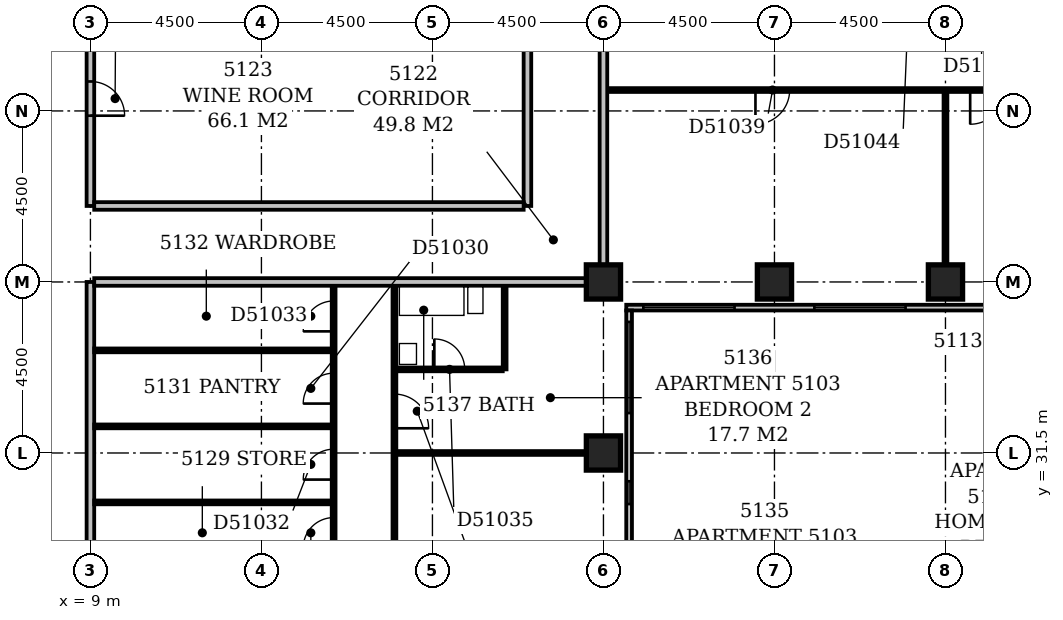
"""IFC4 building model, lengths in metres.
Left out: names, types, materials, properties, quantities, classifications, styles, units other than length and angle.
Written with IfcOpenShell. Run it as: python <this file> out.ifc"""

import sys

from ifc_helpers import new_model, si_unit, direction, frame, frame_2d, origin, origin_2d, place, context, subcontext, project, spatial, rectangle, extrude, element, fill, save


model = new_model("IFC4")
c1 = context("Model", 3, precision=1e-05, world=origin(), true_north=direction((0.0, 1.0)))
c2 = subcontext(c1, "Body", "Model", "MODEL_VIEW")
j1 = project(units=[si_unit("LENGTHUNIT", "METRE"), si_unit("PLANEANGLEUNIT", "RADIAN")], contexts=[c1])
p1 = place(None, origin())
s1 = spatial("IfcSite", under=j1, at=p1, CompositionType="ELEMENT")
p2 = place(p1, origin())
s2 = spatial("IfcBuilding", under=s1, at=p2, CompositionType="ELEMENT")
p3 = place(p2, frame((0.0, 0.0, 200.6)))
s3 = spatial("IfcBuildingStorey", under=s2, at=p3, CompositionType="ELEMENT", Elevation=200.6)
for number, where, z_axis, x_axis in (
    (1, (22.5, 31.5, -0.3), (0.0, 0.0, 1.0), (1.0, 0.0, 0.0)),
    (2, (22.5, 36.0, -0.3), (0.0, 0.0, 1.0), (1.0, 0.0, 0.0)),
    (3, (27.0, 36.0, -0.3), (0.0, 0.0, 1.0), (1.0, 0.0, 0.0)),
    (4, (31.5, 36.0, -0.3), (0.0, 0.0, 1.0), (1.0, 0.0, 0.0)),
):
    element("IfcColumn", number, at=place(p3, frame(where, z_axis=z_axis, x_axis=x_axis)), inside=s3, PredefinedType="COLUMN", context=c2, shape_type="SweptSolid", body=[
        extrude(rectangle(XDim=0.9, YDim=0.9, at=origin_2d()), origin(), (0.0, 0.0, 1.0), 3.6),
    ])
p4 = place(p3, frame((23.175, 17.4, 0.0), z_axis=(0.0, 0.0, 1.0), x_axis=(0.0, 1.0, 0.0)))
e5 = element("IfcWall", 5, at=p4, inside=s3, PredefinedType="STANDARD", context=c2, shape_type="SweptSolid", body=[
    extrude(rectangle(XDim=17.85, YDim=0.15, at=frame_2d((8.925, 0.0))), origin(), (0.0, 0.0, 1.0), 2.7),
])
p5 = place(p4, frame((1.65, 0.0, 0.6)))
e6 = element("IfcOpeningElement", 6, at=p5, cuts=e5, PredefinedType="OPENING", context=c2, shape_type="SweptSolid", body=[
    extrude(rectangle(XDim=2.4, YDim=1.8, at=frame_2d((1.2, 0.9))), frame((0.0, 0.087, 0.0), z_axis=(0.0, -1.0, 0.0), x_axis=(1.0, 0.0, 0.0)), (0.0, 0.0, 1.0), 0.174),
])
p6 = place(p4, frame((6.15, 0.0, 0.6)))
e7 = element("IfcOpeningElement", 7, at=p6, cuts=e5, PredefinedType="OPENING", context=c2, shape_type="SweptSolid", body=[
    extrude(rectangle(XDim=2.4, YDim=1.8, at=frame_2d((1.2, 0.9))), frame((0.0, 0.087, 0.0), z_axis=(0.0, -1.0, 0.0), x_axis=(1.0, 0.0, 0.0)), (0.0, 0.0, 1.0), 0.174),
])
p7 = place(p4, frame((10.252, 0.0, 0.6)))
e8 = element("IfcOpeningElement", 8, at=p7, cuts=e5, PredefinedType="OPENING", context=c2, shape_type="SweptSolid", body=[
    extrude(rectangle(XDim=0.6, YDim=1.8, at=frame_2d((0.3, 0.9))), frame((0.0, 0.087, 0.0), z_axis=(0.0, -1.0, 0.0), x_axis=(1.0, 0.0, 0.0)), (0.0, 0.0, 1.0), 0.174),
])
p8 = place(p4, frame((12.756, 0.0, 0.6)))
e9 = element("IfcOpeningElement", 9, at=p8, cuts=e5, PredefinedType="OPENING", context=c2, shape_type="SweptSolid", body=[
    extrude(rectangle(XDim=0.6, YDim=1.8, at=frame_2d((0.3, 0.9))), frame((0.0, 0.087, 0.0), z_axis=(0.0, -1.0, 0.0), x_axis=(1.0, 0.0, 0.0)), (0.0, 0.0, 1.0), 0.174),
])
p9 = place(p4, frame((15.15, 0.0, 0.6)))
e10 = element("IfcOpeningElement", 10, at=p9, cuts=e5, PredefinedType="OPENING", context=c2, shape_type="SweptSolid", body=[
    extrude(rectangle(XDim=2.4, YDim=1.8, at=frame_2d((1.2, 0.9))), frame((0.0, 0.087, 0.0), z_axis=(0.0, -1.0, 0.0), x_axis=(1.0, 0.0, 0.0)), (0.0, 0.0, 1.0), 0.174),
])
p10 = place(p3, frame((23.1, 35.325, 0.0), z_axis=(0.0, 0.0, 1.0), x_axis=(1.0, 0.0, 0.0)))
e11 = element("IfcWall", 11, at=p10, inside=s3, PredefinedType="STANDARD", context=c2, shape_type="SweptSolid", body=[
    extrude(rectangle(XDim=27.15, YDim=0.15, at=frame_2d((13.575, 0.0))), origin(), (0.0, 0.0, 1.0), 2.7),
])
p11 = place(p10, frame((0.45, 0.0, 0.6)))
e12 = element("IfcOpeningElement", 12, at=p11, cuts=e11, PredefinedType="OPENING", context=c2, shape_type="SweptSolid", body=[
    extrude(rectangle(XDim=2.4, YDim=1.8, at=frame_2d((1.2, 0.9))), frame((0.0, 0.087, 0.0), z_axis=(0.0, -1.0, 0.0), x_axis=(1.0, 0.0, 0.0)), (0.0, 0.0, 1.0), 0.174),
])
p12 = place(p10, frame((4.95, 0.0, 0.6)))
e13 = element("IfcOpeningElement", 13, at=p12, cuts=e11, PredefinedType="OPENING", context=c2, shape_type="SweptSolid", body=[
    extrude(rectangle(XDim=2.4, YDim=1.8, at=frame_2d((1.2, 0.9))), frame((0.0, 0.087, 0.0), z_axis=(0.0, -1.0, 0.0), x_axis=(1.0, 0.0, 0.0)), (0.0, 0.0, 1.0), 0.174),
])
p13 = place(p10, frame((9.45, 0.0, 0.6)))
e14 = element("IfcOpeningElement", 14, at=p13, cuts=e11, PredefinedType="OPENING", context=c2, shape_type="SweptSolid", body=[
    extrude(rectangle(XDim=2.4, YDim=1.8, at=frame_2d((1.2, 0.9))), frame((0.0, 0.087, 0.0), z_axis=(0.0, -1.0, 0.0), x_axis=(1.0, 0.0, 0.0)), (0.0, 0.0, 1.0), 0.174),
])
p14 = place(p10, frame((13.95, 0.0, 0.6)))
e15 = element("IfcOpeningElement", 15, at=p14, cuts=e11, PredefinedType="OPENING", context=c2, shape_type="SweptSolid", body=[
    extrude(rectangle(XDim=2.4, YDim=1.8, at=frame_2d((1.2, 0.9))), frame((0.0, 0.087, 0.0), z_axis=(0.0, -1.0, 0.0), x_axis=(1.0, 0.0, 0.0)), (0.0, 0.0, 1.0), 0.174),
])
p15 = place(p10, frame((18.45, 0.0, 0.6)))
e16 = element("IfcOpeningElement", 16, at=p15, cuts=e11, PredefinedType="OPENING", context=c2, shape_type="SweptSolid", body=[
    extrude(rectangle(XDim=2.4, YDim=1.8, at=frame_2d((1.2, 0.9))), frame((0.0, 0.087, 0.0), z_axis=(0.0, -1.0, 0.0), x_axis=(1.0, 0.0, 0.0)), (0.0, 0.0, 1.0), 0.174),
])
p16 = place(p10, frame((22.95, 0.0, 0.6)))
e17 = element("IfcOpeningElement", 17, at=p16, cuts=e11, PredefinedType="OPENING", context=c2, shape_type="SweptSolid", body=[
    extrude(rectangle(XDim=2.4, YDim=1.8, at=frame_2d((1.2, 0.9))), frame((0.0, 0.087, 0.0), z_axis=(0.0, -1.0, 0.0), x_axis=(1.0, 0.0, 0.0)), (0.0, 0.0, 1.0), 0.174),
])
p17 = place(p3, frame((9.0, 5.0, 0.0), z_axis=(0.0, 0.0, 1.0), x_axis=(0.0, 1.0, 0.0)))
e18 = element("IfcWall", 18, at=p17, inside=s3, PredefinedType="PARTITIONING", context=c2, shape_type="SweptSolid", body=[
    extrude(rectangle(XDim=31.0, YDim=0.2, at=frame_2d((15.5, 0.0))), origin(), (0.0, 0.0, 1.0), 3.3),
])
p18 = place(p17, frame((18.4, 0.0, 0.0)))
e19 = element("IfcOpeningElement", 19, at=p18, cuts=e18, PredefinedType="OPENING", context=c2, shape_type="SweptSolid", body=[
    extrude(rectangle(XDim=1.0, YDim=2.1, at=frame_2d((0.5, 1.05))), frame((0.0, 0.112, 0.0), z_axis=(0.0, -1.0, 0.0), x_axis=(1.0, 0.0, 0.0)), (0.0, 0.0, 1.0), 0.224),
])
p19 = place(p17, frame((11.7, 0.0, 0.0)))
e20 = element("IfcOpeningElement", 20, at=p19, cuts=e18, PredefinedType="OPENING", context=c2, shape_type="SweptSolid", body=[
    extrude(rectangle(XDim=1.0, YDim=2.1, at=frame_2d((0.5, 1.05))), frame((0.0, 0.112, 0.0), z_axis=(0.0, -1.0, 0.0), x_axis=(1.0, 0.0, 0.0)), (0.0, 0.0, 1.0), 0.224),
])
p20 = place(p17, frame((1.5, 0.0, 0.0)))
e21 = element("IfcOpeningElement", 21, at=p20, cuts=e18, PredefinedType="OPENING", context=c2, shape_type="SweptSolid", body=[
    extrude(rectangle(XDim=0.9, YDim=2.1, at=frame_2d((0.45, 1.05))), frame((0.0, 0.112, 0.0), z_axis=(0.0, -1.0, 0.0), x_axis=(1.0, 0.0, 0.0)), (0.0, 0.0, 1.0), 0.224),
])
p21 = place(p3, frame((17.0, 18.1, 0.0), z_axis=(0.0, 0.0, 1.0), x_axis=(0.0, 1.0, 0.0)))
e22 = element("IfcWall", 22, at=p21, inside=s3, PredefinedType="PARTITIONING", context=c2, shape_type="SweptSolid", body=[
    extrude(rectangle(XDim=17.8, YDim=0.1, at=frame_2d((8.9, 0.0))), origin(), (0.0, 0.0, 1.0), 3.3),
])
p22 = place(p21, frame((2.85, 0.0, 0.0)))
e23 = element("IfcOpeningElement", 23, at=p22, cuts=e22, PredefinedType="OPENING", context=c2, shape_type="SweptSolid", body=[
    extrude(rectangle(XDim=0.9, YDim=2.1, at=frame_2d((0.45, 1.05))), frame((0.0, 0.062, 0.0), z_axis=(0.0, -1.0, 0.0), x_axis=(1.0, 0.0, 0.0)), (0.0, 0.0, 1.0), 0.124),
])
p23 = place(p21, frame((8.4, 0.0, 0.0)))
e24 = element("IfcOpeningElement", 24, at=p23, cuts=e22, PredefinedType="OPENING", context=c2, shape_type="SweptSolid", body=[
    extrude(rectangle(XDim=0.9, YDim=2.1, at=frame_2d((0.45, 1.05))), frame((0.0, 0.062, 0.0), z_axis=(0.0, -1.0, 0.0), x_axis=(1.0, 0.0, 0.0)), (0.0, 0.0, 1.0), 0.124),
])
p24 = place(p21, frame((14.05, 0.0, 0.0)))
e25 = element("IfcOpeningElement", 25, at=p24, cuts=e22, PredefinedType="OPENING", context=c2, shape_type="SweptSolid", body=[
    extrude(rectangle(XDim=0.9, YDim=2.1, at=frame_2d((0.45, 1.05))), frame((0.0, 0.062, 0.0), z_axis=(0.0, -1.0, 0.0), x_axis=(1.0, 0.0, 0.0)), (0.0, 0.0, 1.0), 0.124),
])
p25 = place(p3, frame((15.4, 24.7, 0.0), z_axis=(0.0, 0.0, 1.0), x_axis=(0.0, 1.0, 0.0)))
e26 = element("IfcWall", 26, at=p25, inside=s3, PredefinedType="PARTITIONING", context=c2, shape_type="SweptSolid", body=[
    extrude(rectangle(XDim=11.2, YDim=0.1, at=frame_2d((5.6, 0.0))), origin(), (0.0, 0.0, 1.0), 3.3),
])
p26 = place(p25, frame((0.8, 0.0, 0.0)))
e27 = element("IfcOpeningElement", 27, at=p26, cuts=e26, PredefinedType="OPENING", context=c2, shape_type="SweptSolid", body=[
    extrude(rectangle(XDim=0.8, YDim=2.1, at=frame_2d((0.4, 1.05))), frame((0.0, 0.062, 0.0), z_axis=(0.0, -1.0, 0.0), x_axis=(1.0, 0.0, 0.0)), (0.0, 0.0, 1.0), 0.124),
])
p27 = place(p25, frame((8.1, 0.0, 0.0)))
e28 = element("IfcOpeningElement", 28, at=p27, cuts=e26, PredefinedType="OPENING", context=c2, shape_type="SweptSolid", body=[
    extrude(rectangle(XDim=0.8, YDim=2.1, at=frame_2d((0.4, 1.05))), frame((0.0, 0.062, 0.0), z_axis=(0.0, -1.0, 0.0), x_axis=(1.0, 0.0, 0.0)), (0.0, 0.0, 1.0), 0.124),
])
p28 = place(p25, frame((4.3, 0.0, 0.0)))
e29 = element("IfcOpeningElement", 29, at=p28, cuts=e26, PredefinedType="OPENING", context=c2, shape_type="SweptSolid", body=[
    extrude(rectangle(XDim=0.8, YDim=2.1, at=frame_2d((0.4, 1.05))), frame((0.0, 0.062, 0.0), z_axis=(0.0, -1.0, 0.0), x_axis=(1.0, 0.0, 0.0)), (0.0, 0.0, 1.0), 0.124),
])
p29 = place(p25, frame((6.1, 0.0, 0.0)))
e30 = element("IfcOpeningElement", 30, at=p29, cuts=e26, PredefinedType="OPENING", context=c2, shape_type="SweptSolid", body=[
    extrude(rectangle(XDim=0.8, YDim=2.1, at=frame_2d((0.4, 1.05))), frame((0.0, 0.062, 0.0), z_axis=(0.0, -1.0, 0.0), x_axis=(1.0, 0.0, 0.0)), (0.0, 0.0, 1.0), 0.124),
])
p30 = place(p25, frame((10.0, 0.0, 0.0)))
e31 = element("IfcOpeningElement", 31, at=p30, cuts=e26, PredefinedType="OPENING", context=c2, shape_type="SweptSolid", body=[
    extrude(rectangle(XDim=0.8, YDim=2.1, at=frame_2d((0.4, 1.05))), frame((0.0, 0.062, 0.0), z_axis=(0.0, -1.0, 0.0), x_axis=(1.0, 0.0, 0.0)), (0.0, 0.0, 1.0), 0.124),
])
p31 = place(p25, frame((2.75, 0.0, 0.0)))
e32 = element("IfcOpeningElement", 32, at=p31, cuts=e26, PredefinedType="OPENING", context=c2, shape_type="SweptSolid", body=[
    extrude(rectangle(XDim=0.8, YDim=2.1, at=frame_2d((0.4, 1.05))), frame((0.0, 0.062, 0.0), z_axis=(0.0, -1.0, 0.0), x_axis=(1.0, 0.0, 0.0)), (0.0, 0.0, 1.0), 0.124),
])
p32 = place(p3, frame((9.1, 30.2, 0.0), z_axis=(0.0, 0.0, 1.0), x_axis=(1.0, 0.0, 0.0)))
e33 = element("IfcWall", 33, at=p32, inside=s3, PredefinedType="PARTITIONING", context=c2, shape_type="SweptSolid", body=[
    extrude(rectangle(XDim=6.25, YDim=0.1, at=frame_2d((3.125, 0.0))), origin(), (0.0, 0.0, 1.0), 3.3),
])
p33 = place(p3, frame((17.05, 31.5, 0.0), z_axis=(0.0, 0.0, 1.0), x_axis=(1.0, 0.0, 0.0)))
e34 = element("IfcWall", 34, at=p33, inside=s3, PredefinedType="PARTITIONING", context=c2, shape_type="SweptSolid", body=[
    extrude(rectangle(XDim=5.0, YDim=0.1, at=frame_2d((2.5, 0.0))), origin(), (0.0, 0.0, 1.0), 3.3),
])
p34 = place(p3, frame((9.1, 32.2, 0.0), z_axis=(0.0, 0.0, 1.0), x_axis=(1.0, 0.0, 0.0)))
e35 = element("IfcWall", 35, at=p34, inside=s3, PredefinedType="PARTITIONING", context=c2, shape_type="SweptSolid", body=[
    extrude(rectangle(XDim=6.25, YDim=0.1, at=frame_2d((3.125, 0.0))), origin(), (0.0, 0.0, 1.0), 3.3),
])
p35 = place(p3, frame((17.05, 33.7, 0.0), z_axis=(0.0, 0.0, 1.0), x_axis=(1.0, 0.0, 0.0)))
e36 = element("IfcWall", 36, at=p35, inside=s3, PredefinedType="PLUMBINGWALL", context=c2, shape_type="SweptSolid", body=[
    extrude(rectangle(XDim=2.8, YDim=0.1, at=frame_2d((1.4, 0.0))), origin(), (0.0, 0.0, 1.0), 3.3),
])
p36 = place(p35, frame((1.0, 0.0, 0.0)))
e37 = element("IfcOpeningElement", 37, at=p36, cuts=e36, PredefinedType="OPENING", context=c2, shape_type="SweptSolid", body=[
    extrude(rectangle(XDim=0.8, YDim=2.1, at=frame_2d((0.4, 1.05))), frame((0.0, 0.062, 0.0), z_axis=(0.0, -1.0, 0.0), x_axis=(1.0, 0.0, 0.0)), (0.0, 0.0, 1.0), 0.124),
])
p37 = place(p3, frame((19.9, 33.7, 0.0), z_axis=(0.0, 0.0, 1.0), x_axis=(0.0, 1.0, 0.0)))
e38 = element("IfcWall", 38, at=p37, inside=s3, PredefinedType="PLUMBINGWALL", context=c2, shape_type="SweptSolid", body=[
    extrude(rectangle(XDim=2.2, YDim=0.1, at=frame_2d((1.1, 0.0))), origin(), (0.0, 0.0, 1.0), 3.3),
])
p38 = place(p3, frame((9.1, 34.2, 0.0), z_axis=(0.0, 0.0, 1.0), x_axis=(1.0, 0.0, 0.0)))
e39 = element("IfcWall", 39, at=p38, inside=s3, PredefinedType="PARTITIONING", context=c2, shape_type="SweptSolid", body=[
    extrude(rectangle(XDim=6.25, YDim=0.1, at=frame_2d((3.125, 0.0))), origin(), (0.0, 0.0, 1.0), 3.3),
])
p39 = place(p3, frame((9.1, 36.0, 0.0), z_axis=(0.0, 0.0, 1.0), x_axis=(1.0, 0.0, 0.0)))
e40 = element("IfcWall", 40, at=p39, inside=s3, PredefinedType="PARTITIONING", context=c2, shape_type="SweptSolid", body=[
    extrude(rectangle(XDim=12.95, YDim=0.2, at=frame_2d((6.475, 0.0))), origin(), (0.0, 0.0, 1.0), 3.3),
])
p40 = place(p3, frame((22.5, 36.45, 0.0), z_axis=(0.0, 0.0, 1.0), x_axis=(0.0, 1.0, 0.0)))
e41 = element("IfcWall", 41, at=p40, inside=s3, PredefinedType="PARTITIONING", context=c2, shape_type="SweptSolid", body=[
    extrude(rectangle(XDim=13.05, YDim=0.2, at=frame_2d((6.525, 0.0))), origin(), (0.0, 0.0, 1.0), 3.3),
])
p41 = place(p3, frame((31.5, 36.45, 0.0), z_axis=(0.0, 0.0, 1.0), x_axis=(0.0, 1.0, 0.0)))
e42 = element("IfcWall", 42, at=p41, inside=s3, PredefinedType="PARTITIONING", context=c2, shape_type="SweptSolid", body=[
    extrude(rectangle(XDim=4.55, YDim=0.1, at=frame_2d((2.275, 0.0))), origin(), (0.0, 0.0, 1.0), 3.3),
])
p42 = place(p3, frame((9.0, 38.0, 0.0), z_axis=(0.0, 0.0, 1.0), x_axis=(0.0, 1.0, 0.0)))
e43 = element("IfcWall", 43, at=p42, inside=s3, PredefinedType="PARTITIONING", context=c2, shape_type="SweptSolid", body=[
    extrude(rectangle(XDim=11.5, YDim=0.2, at=frame_2d((5.75, 0.0))), origin(), (0.0, 0.0, 1.0), 3.3),
])
p43 = place(p42, frame((2.375, 0.0, 0.0)))
e44 = element("IfcOpeningElement", 44, at=p43, cuts=e43, PredefinedType="OPENING", context=c2, shape_type="SweptSolid", body=[
    extrude(rectangle(XDim=0.9, YDim=2.1, at=frame_2d((0.45, 1.05))), frame((0.0, 0.112, 0.0), z_axis=(0.0, -1.0, 0.0), x_axis=(1.0, 0.0, 0.0)), (0.0, 0.0, 1.0), 0.224),
])
p44 = place(p3, frame((9.1, 38.0, 0.0), z_axis=(0.0, 0.0, 1.0), x_axis=(1.0, 0.0, 0.0)))
e45 = element("IfcWall", 45, at=p44, inside=s3, PredefinedType="PARTITIONING", context=c2, shape_type="SweptSolid", body=[
    extrude(rectangle(XDim=11.3, YDim=0.2, at=frame_2d((5.65, 0.0))), origin(), (0.0, 0.0, 1.0), 3.3),
])
p45 = place(p3, frame((20.5, 38.0, 0.0), z_axis=(0.0, 0.0, 1.0), x_axis=(0.0, 1.0, 0.0)))
e46 = element("IfcWall", 46, at=p45, inside=s3, PredefinedType="PARTITIONING", context=c2, shape_type="SweptSolid", body=[
    extrude(rectangle(XDim=11.5, YDim=0.2, at=frame_2d((5.75, 0.0))), origin(), (0.0, 0.0, 1.0), 3.3),
])
p46 = place(p3, frame((22.6, 41.05, 0.0), z_axis=(0.0, 0.0, 1.0), x_axis=(1.0, 0.0, 0.0)))
e47 = element("IfcWall", 47, at=p46, inside=s3, PredefinedType="PARTITIONING", context=c2, shape_type="SweptSolid", body=[
    extrude(rectangle(XDim=22.3, YDim=0.1, at=frame_2d((11.15, 0.0))), origin(), (0.0, 0.0, 1.0), 3.3),
])
p47 = place(p46, frame((3.9, 0.0, 0.0)))
e48 = element("IfcOpeningElement", 48, at=p47, cuts=e47, PredefinedType="OPENING", context=c2, shape_type="SweptSolid", body=[
    extrude(rectangle(XDim=0.9, YDim=2.1, at=frame_2d((0.45, 1.05))), frame((0.0, 0.062, 0.0), z_axis=(0.0, -1.0, 0.0), x_axis=(1.0, 0.0, 0.0)), (0.0, 0.0, 1.0), 0.124),
])
p48 = place(p46, frame((9.55, 0.0, 0.0)))
e49 = element("IfcOpeningElement", 49, at=p48, cuts=e47, PredefinedType="OPENING", context=c2, shape_type="SweptSolid", body=[
    extrude(rectangle(XDim=0.9, YDim=2.1, at=frame_2d((0.45, 1.05))), frame((0.0, 0.062, 0.0), z_axis=(0.0, -1.0, 0.0), x_axis=(1.0, 0.0, 0.0)), (0.0, 0.0, 1.0), 0.124),
])
p49 = place(p46, frame((16.35, 0.0, 0.0)))
e50 = element("IfcOpeningElement", 50, at=p49, cuts=e47, PredefinedType="OPENING", context=c2, shape_type="SweptSolid", body=[
    extrude(rectangle(XDim=0.9, YDim=2.1, at=frame_2d((0.45, 1.05))), frame((0.0, 0.062, 0.0), z_axis=(0.0, -1.0, 0.0), x_axis=(1.0, 0.0, 0.0)), (0.0, 0.0, 1.0), 0.124),
])
p50 = place(p46, frame((19.7, 0.0, 0.0)))
e51 = element("IfcOpeningElement", 51, at=p50, cuts=e47, PredefinedType="OPENING", context=c2, shape_type="SweptSolid", body=[
    extrude(rectangle(XDim=0.9, YDim=2.1, at=frame_2d((0.45, 1.05))), frame((0.0, 0.062, 0.0), z_axis=(0.0, -1.0, 0.0), x_axis=(1.0, 0.0, 0.0)), (0.0, 0.0, 1.0), 0.124),
])
p51 = place(p8, origin())
e52 = element("IfcWindow", 52, at=p51, inside=s3, PartitioningType="SINGLE_PANEL", PredefinedType="WINDOW", context=c2, shape_type="SweptSolid", body=[
    extrude(rectangle(XDim=0.6, YDim=1.8, at=frame_2d((0.3, 0.9))), frame((0.0, 0.03, 0.0), z_axis=(0.0, -1.0, 0.0), x_axis=(1.0, 0.0, 0.0)), (0.0, 0.0, 1.0), 0.06),
])
fill(e9, e52)
p52 = place(p9, origin())
e53 = element("IfcWindow", 53, at=p52, inside=s3, PartitioningType="SINGLE_PANEL", PredefinedType="WINDOW", context=c2, shape_type="SweptSolid", body=[
    extrude(rectangle(XDim=2.4, YDim=1.8, at=frame_2d((1.2, 0.9))), frame((0.0, 0.03, 0.0), z_axis=(0.0, -1.0, 0.0), x_axis=(1.0, 0.0, 0.0)), (0.0, 0.0, 1.0), 0.06),
])
fill(e10, e53)
p53 = place(p11, origin())
e54 = element("IfcWindow", 54, at=p53, inside=s3, PartitioningType="SINGLE_PANEL", PredefinedType="WINDOW", context=c2, shape_type="SweptSolid", body=[
    extrude(rectangle(XDim=2.4, YDim=1.8, at=frame_2d((1.2, 0.9))), frame((0.0, 0.03, 0.0), z_axis=(0.0, -1.0, 0.0), x_axis=(1.0, 0.0, 0.0)), (0.0, 0.0, 1.0), 0.06),
])
fill(e12, e54)
p54 = place(p12, origin())
e55 = element("IfcWindow", 55, at=p54, inside=s3, PartitioningType="SINGLE_PANEL", PredefinedType="WINDOW", context=c2, shape_type="SweptSolid", body=[
    extrude(rectangle(XDim=2.4, YDim=1.8, at=frame_2d((1.2, 0.9))), frame((0.0, 0.03, 0.0), z_axis=(0.0, -1.0, 0.0), x_axis=(1.0, 0.0, 0.0)), (0.0, 0.0, 1.0), 0.06),
])
fill(e13, e55)
p55 = place(p24, frame((0.9, 0.0, 0.0), z_axis=(0.0, 0.0, 1.0), x_axis=(-1.0, 0.0, 0.0)))
e56 = element("IfcDoor", 56, at=p55, inside=s3, OperationType="SINGLE_SWING_RIGHT", PredefinedType="DOOR", context=c2, shape_type="SweptSolid", body=[
    extrude(rectangle(XDim=0.9, YDim=2.1, at=frame_2d((0.45, 1.05))), frame((0.0, 0.025, 0.0), z_axis=(0.0, -1.0, 0.0), x_axis=(1.0, 0.0, 0.0)), (0.0, 0.0, 1.0), 0.05),
])
fill(e25, e56)
p56 = place(p27, origin())
e57 = element("IfcDoor", 57, at=p56, inside=s3, OperationType="SINGLE_SWING_LEFT", PredefinedType="DOOR", context=c2, shape_type="SweptSolid", body=[
    extrude(rectangle(XDim=0.8, YDim=2.1, at=frame_2d((0.4, 1.05))), frame((0.0, 0.025, 0.0), z_axis=(0.0, -1.0, 0.0), x_axis=(1.0, 0.0, 0.0)), (0.0, 0.0, 1.0), 0.05),
])
fill(e28, e57)
p57 = place(p28, origin())
e58 = element("IfcDoor", 58, at=p57, inside=s3, OperationType="SINGLE_SWING_LEFT", PredefinedType="DOOR", context=c2, shape_type="SweptSolid", body=[
    extrude(rectangle(XDim=0.8, YDim=2.1, at=frame_2d((0.4, 1.05))), frame((0.0, 0.025, 0.0), z_axis=(0.0, -1.0, 0.0), x_axis=(1.0, 0.0, 0.0)), (0.0, 0.0, 1.0), 0.05),
])
fill(e29, e58)
p58 = place(p29, origin())
e59 = element("IfcDoor", 59, at=p58, inside=s3, OperationType="SINGLE_SWING_LEFT", PredefinedType="DOOR", context=c2, shape_type="SweptSolid", body=[
    extrude(rectangle(XDim=0.8, YDim=2.1, at=frame_2d((0.4, 1.05))), frame((0.0, 0.025, 0.0), z_axis=(0.0, -1.0, 0.0), x_axis=(1.0, 0.0, 0.0)), (0.0, 0.0, 1.0), 0.05),
])
fill(e30, e59)
p59 = place(p30, origin())
e60 = element("IfcDoor", 60, at=p59, inside=s3, OperationType="SINGLE_SWING_LEFT", PredefinedType="DOOR", context=c2, shape_type="SweptSolid", body=[
    extrude(rectangle(XDim=0.8, YDim=2.1, at=frame_2d((0.4, 1.05))), frame((0.0, 0.025, 0.0), z_axis=(0.0, -1.0, 0.0), x_axis=(1.0, 0.0, 0.0)), (0.0, 0.0, 1.0), 0.05),
])
fill(e31, e60)
p60 = place(p36, origin())
e61 = element("IfcDoor", 61, at=p60, inside=s3, OperationType="SINGLE_SWING_LEFT", PredefinedType="DOOR", context=c2, shape_type="SweptSolid", body=[
    extrude(rectangle(XDim=0.8, YDim=2.1, at=frame_2d((0.4, 1.05))), frame((0.0, 0.025, 0.0), z_axis=(0.0, -1.0, 0.0), x_axis=(1.0, 0.0, 0.0)), (0.0, 0.0, 1.0), 0.05),
])
fill(e37, e61)
p61 = place(p43, frame((0.9, 0.0, 0.0), z_axis=(0.0, 0.0, 1.0), x_axis=(-1.0, 0.0, 0.0)))
e62 = element("IfcDoor", 62, at=p61, inside=s3, OperationType="SINGLE_SWING_RIGHT", PredefinedType="DOOR", context=c2, shape_type="SweptSolid", body=[
    extrude(rectangle(XDim=0.9, YDim=2.1, at=frame_2d((0.45, 1.05))), frame((0.0, 0.025, 0.0), z_axis=(0.0, -1.0, 0.0), x_axis=(1.0, 0.0, 0.0)), (0.0, 0.0, 1.0), 0.05),
])
fill(e44, e62)
p62 = place(p47, frame((0.9, 0.0, 0.0), z_axis=(0.0, 0.0, 1.0), x_axis=(-1.0, 0.0, 0.0)))
e63 = element("IfcDoor", 63, at=p62, inside=s3, OperationType="SINGLE_SWING_RIGHT", PredefinedType="DOOR", context=c2, shape_type="SweptSolid", body=[
    extrude(rectangle(XDim=0.9, YDim=2.1, at=frame_2d((0.45, 1.05))), frame((0.0, 0.025, 0.0), z_axis=(0.0, -1.0, 0.0), x_axis=(1.0, 0.0, 0.0)), (0.0, 0.0, 1.0), 0.05),
])
fill(e48, e63)
p63 = place(p48, frame((0.9, 0.0, 0.0), z_axis=(0.0, 0.0, 1.0), x_axis=(-1.0, 0.0, 0.0)))
e64 = element("IfcDoor", 64, at=p63, inside=s3, OperationType="SINGLE_SWING_RIGHT", PredefinedType="DOOR", context=c2, shape_type="SweptSolid", body=[
    extrude(rectangle(XDim=0.9, YDim=2.1, at=frame_2d((0.45, 1.05))), frame((0.0, 0.025, 0.0), z_axis=(0.0, -1.0, 0.0), x_axis=(1.0, 0.0, 0.0)), (0.0, 0.0, 1.0), 0.05),
])
fill(e49, e64)
save(model, sys.argv[1])
